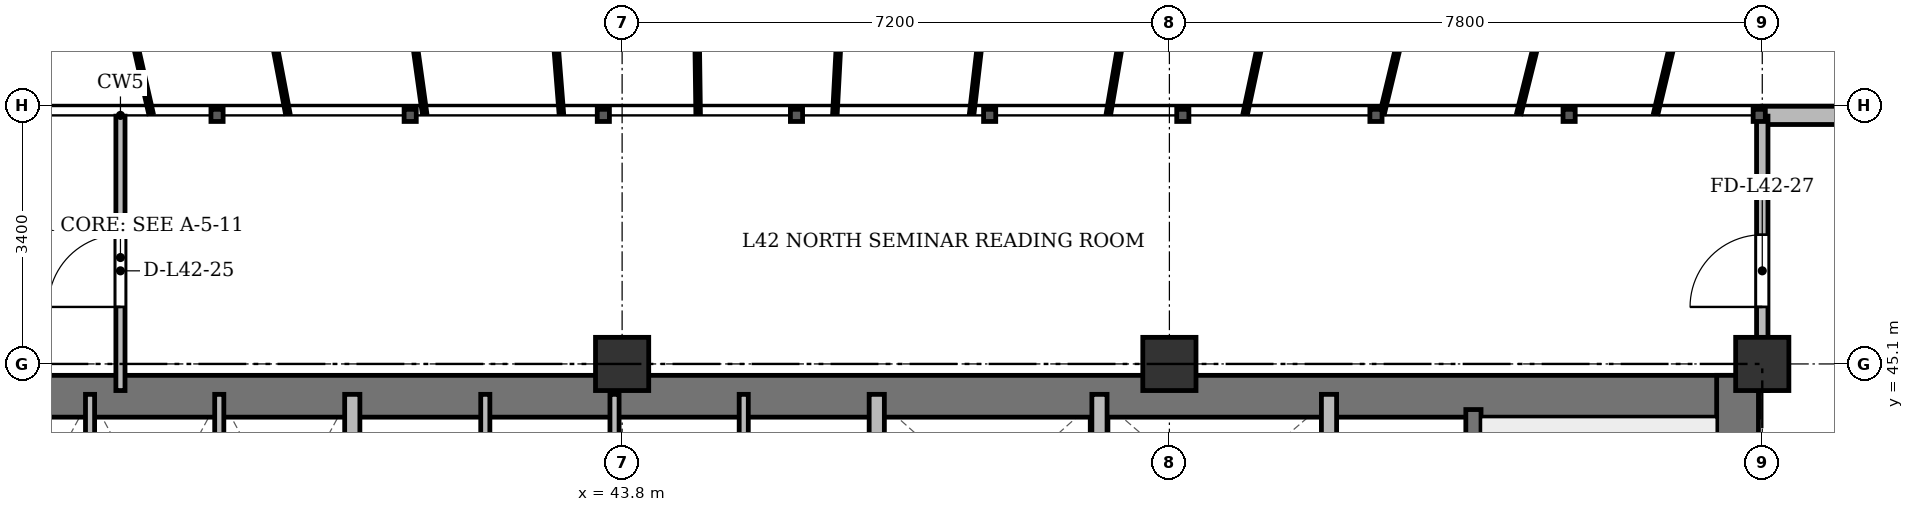
"""IFC4 building model, lengths in metres.
Left out: names, types, materials, properties, quantities, classifications, styles, units other than length and angle.
Written with IfcOpenShell. Run it as: python <this file> out.ifc"""

import sys

from ifc_helpers import new_model, si_unit, direction, frame, frame_2d, origin, origin_2d, place, context, subcontext, project, spatial, rectangle, extrude, source, transform, mapped, element, fill, save


model = new_model("IFC4")
c1 = context("Model", 3, precision=1e-05, world=origin(), true_north=direction((0.0, 1.0)))
c2 = subcontext(c1, "Body", "Model", "MODEL_VIEW")
j1 = project(units=[si_unit("LENGTHUNIT", "METRE"), si_unit("PLANEANGLEUNIT", "RADIAN")], contexts=[c1])
p1 = place(None, origin())
s1 = spatial("IfcSite", under=j1, at=p1, CompositionType="ELEMENT")
p2 = place(p1, origin())
s2 = spatial("IfcBuilding", under=s1, at=p2, CompositionType="ELEMENT")
p3 = place(p2, frame((0.0, 0.0, 160.9)))
s3 = spatial("IfcBuildingStorey", under=s2, at=p3, CompositionType="ELEMENT", Elevation=160.9)
m1 = source(origin(), c2, "Body", "SweptSolid", [
    extrude(rectangle(XDim=0.7, YDim=0.7, at=origin_2d()), origin(), (0.0, 0.0, 1.0), 3.6),
])
for number, where, z_axis, x_axis in (
    (1, (43.8, 45.1, 0.0), (0.0, 0.0, 1.0), (1.0, 0.0, 0.0)),
    (2, (51.0, 45.1, 0.0), (0.0, 0.0, 1.0), (1.0, 0.0, 0.0)),
    (3, (58.8, 45.1, 0.0), (0.0, 0.0, 1.0), (1.0, 0.0, 0.0)),
):
    element("IfcColumn", number, at=place(p3, frame(where, z_axis=z_axis, x_axis=x_axis)), inside=s3, PredefinedType="COLUMN", context=c2, shape_type="MappedRepresentation", body=[
        mapped(m1, transform((0.0, 0.0, 0.0), x_axis=(1.0, 0.0, 0.0), y_axis=(0.0, 1.0, 0.0), z_axis=(0.0, 0.0, 1.0), scale=1.0)),
    ])
p4 = place(p3, frame((58.8, 48.37, 0.0), z_axis=(0.0, 0.0, 1.0), x_axis=(1.0, 0.0, 0.0)))
e4 = element("IfcWall", 4, at=p4, inside=s3, PredefinedType="SOLIDWALL", context=c2, shape_type="SweptSolid", body=[
    extrude(rectangle(XDim=4.7, YDim=0.24, at=frame_2d((2.35, 0.0))), origin(), (0.0, 0.0, 1.0), 3.35),
])
p5 = place(p4, frame((1.368, 0.0, 0.9)))
e5 = element("IfcOpeningElement", 5, at=p5, cuts=e4, PredefinedType="OPENING", context=c2, shape_type="SweptSolid", body=[
    extrude(rectangle(XDim=1.2, YDim=1.65, at=frame_2d((0.6, 0.825))), frame((0.0, 0.13, 0.0), z_axis=(0.0, -1.0, 0.0), x_axis=(1.0, 0.0, 0.0)), (0.0, 0.0, 1.0), 0.26),
])
p6 = place(p3, frame((15.65, 44.675, 0.0), z_axis=(0.0, 0.0, 1.0), x_axis=(1.0, 0.0, 0.0)))
e6 = element("IfcWall", 6, at=p6, inside=s3, PredefinedType="SHEAR", context=c2, shape_type="SweptSolid", body=[
    extrude(rectangle(XDim=43.1, YDim=0.55, at=frame_2d((21.55, 0.0))), origin(), (0.0, 0.0, 1.0), 3.35),
])
p7 = place(p3, frame((58.475, 33.4, 0.0), z_axis=(0.0, 0.0, 1.0), x_axis=(0.0, 1.0, 0.0)))
e7 = element("IfcWall", 7, at=p7, inside=s3, PredefinedType="SHEAR", context=c2, shape_type="SweptSolid", body=[
    extrude(rectangle(XDim=11.55, YDim=0.55, at=frame_2d((5.775, 0.0))), origin(), (0.0, 0.0, 1.0), 3.35),
])
p8 = place(p3, frame((55.0, 33.4, 0.0), z_axis=(0.0, 0.0, 1.0), x_axis=(0.0, 1.0, 0.0)))
e8 = element("IfcWall", 8, at=p8, inside=s3, PredefinedType="SHEAR", context=c2, shape_type="SweptSolid", body=[
    extrude(rectangle(XDim=11.1, YDim=0.2, at=frame_2d((5.55, 0.0))), origin(), (0.0, 0.0, 1.0), 3.35),
])
p9 = place(p8, frame((0.85, 0.0, 0.0)))
e9 = element("IfcOpeningElement", 9, at=p9, cuts=e8, PredefinedType="OPENING", context=c2, shape_type="SweptSolid", body=[
    extrude(rectangle(XDim=1.1, YDim=2.15, at=frame_2d((0.55, 1.075))), frame((0.0, 0.11, 0.0), z_axis=(0.0, -1.0, 0.0), x_axis=(1.0, 0.0, 0.0)), (0.0, 0.0, 1.0), 0.22),
])
for number, where, z_axis, x_axis in (
    (10, (36.8, 41.5, 0.0), (0.0, 0.0, 1.0), (0.0, 1.0, 0.0)),
    (11, (38.5, 41.5, 0.0), (0.0, 0.0, 1.0), (0.0, 1.0, 0.0)),
):
    element("IfcWall", number, at=place(p3, frame(where, z_axis=z_axis, x_axis=x_axis)), inside=s3, PredefinedType="PARTITIONING", context=c2, shape_type="SweptSolid", body=[
        extrude(rectangle(XDim=3.2, YDim=0.12, at=frame_2d((1.6, 0.0))), origin(), (0.0, 0.0, 1.0), 3.35),
    ])
p10 = place(p3, frame((40.25, 41.5, 0.0), z_axis=(0.0, 0.0, 1.0), x_axis=(0.0, 1.0, 0.0)))
e12 = element("IfcWall", 12, at=p10, inside=s3, PredefinedType="SOLIDWALL", context=c2, shape_type="SweptSolid", body=[
    extrude(rectangle(XDim=3.2, YDim=0.2, at=frame_2d((1.6, 0.0))), origin(), (0.0, 0.0, 1.0), 3.35),
])
p11 = place(p3, frame((42.0, 41.5, 0.0), z_axis=(0.0, 0.0, 1.0), x_axis=(0.0, 1.0, 0.0)))
e13 = element("IfcWall", 13, at=p11, inside=s3, PredefinedType="PARTITIONING", context=c2, shape_type="SweptSolid", body=[
    extrude(rectangle(XDim=3.2, YDim=0.12, at=frame_2d((1.6, 0.0))), origin(), (0.0, 0.0, 1.0), 3.35),
])
p12 = place(p3, frame((43.7, 41.5, 0.0), z_axis=(0.0, 0.0, 1.0), x_axis=(0.0, 1.0, 0.0)))
e14 = element("IfcWall", 14, at=p12, inside=s3, PredefinedType="PARTITIONING", context=c2, shape_type="SweptSolid", body=[
    extrude(rectangle(XDim=3.2, YDim=0.12, at=frame_2d((1.6, 0.0))), origin(), (0.0, 0.0, 1.0), 2.85),
])
p13 = place(p3, frame((45.4, 41.5, 0.0), z_axis=(0.0, 0.0, 1.0), x_axis=(0.0, 1.0, 0.0)))
e15 = element("IfcWall", 15, at=p13, inside=s3, PredefinedType="PARTITIONING", context=c2, shape_type="SweptSolid", body=[
    extrude(rectangle(XDim=3.2, YDim=0.12, at=frame_2d((1.6, 0.0))), origin(), (0.0, 0.0, 1.0), 3.35),
])
p14 = place(p3, frame((47.15, 33.4, 0.0), z_axis=(0.0, 0.0, 1.0), x_axis=(0.0, 1.0, 0.0)))
e16 = element("IfcWall", 16, at=p14, inside=s3, PredefinedType="SOLIDWALL", context=c2, shape_type="SweptSolid", body=[
    extrude(rectangle(XDim=11.3, YDim=0.2, at=frame_2d((5.65, 0.0))), origin(), (0.0, 0.0, 1.0), 2.75),
])
for number, where, z_axis, x_axis in (
    (17, (50.08, 42.05, 0.0), (0.0, 0.0, 1.0), (0.0, 1.0, 0.0)),
    (18, (53.1, 42.05, 0.0), (0.0, 0.0, 1.0), (0.0, 1.0, 0.0)),
):
    element("IfcWall", number, at=place(p3, frame(where, z_axis=z_axis, x_axis=x_axis)), inside=s3, PredefinedType="SOLIDWALL", context=c2, shape_type="SweptSolid", body=[
        extrude(rectangle(XDim=2.65, YDim=0.2, at=frame_2d((1.325, 0.0))), origin(), (0.0, 0.0, 1.0), 3.35),
    ])
p15 = place(p3, frame((37.2, 44.75, 0.0), z_axis=(0.0, 0.0, 1.0), x_axis=(0.0, 1.0, 0.0)))
e19 = element("IfcWall", 19, at=p15, inside=s3, PredefinedType="PARTITIONING", context=c2, shape_type="SweptSolid", body=[
    extrude(rectangle(XDim=3.61, YDim=0.12, at=frame_2d((1.805, 0.0))), origin(), (0.0, 0.0, 1.0), 2.75),
])
p16 = place(p15, frame((1.1, 0.0, 0.0)))
e20 = element("IfcOpeningElement", 20, at=p16, cuts=e19, PredefinedType="OPENING", context=c2, shape_type="SweptSolid", body=[
    extrude(rectangle(XDim=0.95, YDim=2.15, at=frame_2d((0.475, 1.075))), frame((0.0, 0.07, 0.0), z_axis=(0.0, -1.0, 0.0), x_axis=(1.0, 0.0, 0.0)), (0.0, 0.0, 1.0), 0.14),
])
p17 = place(p3, frame((58.8, 44.75, 0.0), z_axis=(0.0, 0.0, 1.0), x_axis=(0.0, 1.0, 0.0)))
e21 = element("IfcWall", 21, at=p17, inside=s3, PredefinedType="PARTITIONING", context=c2, shape_type="SweptSolid", body=[
    extrude(rectangle(XDim=3.61, YDim=0.15, at=frame_2d((1.805, 0.0))), origin(), (0.0, 0.0, 1.0), 2.85),
])
p18 = place(p17, frame((1.1, 0.0, 0.0)))
e22 = element("IfcOpeningElement", 22, at=p18, cuts=e21, PredefinedType="OPENING", context=c2, shape_type="SweptSolid", body=[
    extrude(rectangle(XDim=0.95, YDim=2.15, at=frame_2d((0.475, 1.075))), frame((0.0, 0.085, 0.0), z_axis=(0.0, -1.0, 0.0), x_axis=(1.0, 0.0, 0.0)), (0.0, 0.0, 1.0), 0.17),
])
m2 = source(origin(), c2, "Body", "SweptSolid", [
    extrude(rectangle(XDim=0.95, YDim=2.15, at=frame_2d((0.475, 1.075))), frame((0.0, 0.025, 0.0), z_axis=(0.0, -1.0, 0.0), x_axis=(1.0, 0.0, 0.0)), (0.0, 0.0, 1.0), 0.05),
])
p19 = place(p16, origin())
e23 = element("IfcDoor", 23, at=p19, inside=s3, OperationType="SINGLE_SWING_LEFT", PredefinedType="DOOR", context=c2, shape_type="MappedRepresentation", body=[
    mapped(m2, transform((0.0, 0.0, 0.0), x_axis=(1.0, 0.0, 0.0), y_axis=(0.0, 1.0, 0.0), z_axis=(0.0, 0.0, 1.0), scale=1.0)),
])
fill(e20, e23)
p20 = place(p18, origin())
e24 = element("IfcDoor", 24, at=p20, inside=s3, OperationType="SINGLE_SWING_LEFT", PredefinedType="DOOR", context=c2, shape_type="MappedRepresentation", body=[
    mapped(m2, transform((0.0, 0.0, 0.0), x_axis=(1.0, 0.0, 0.0), y_axis=(0.0, 1.0, 0.0), z_axis=(0.0, 0.0, 1.0), scale=1.0)),
])
fill(e22, e24)
save(model, sys.argv[1])
